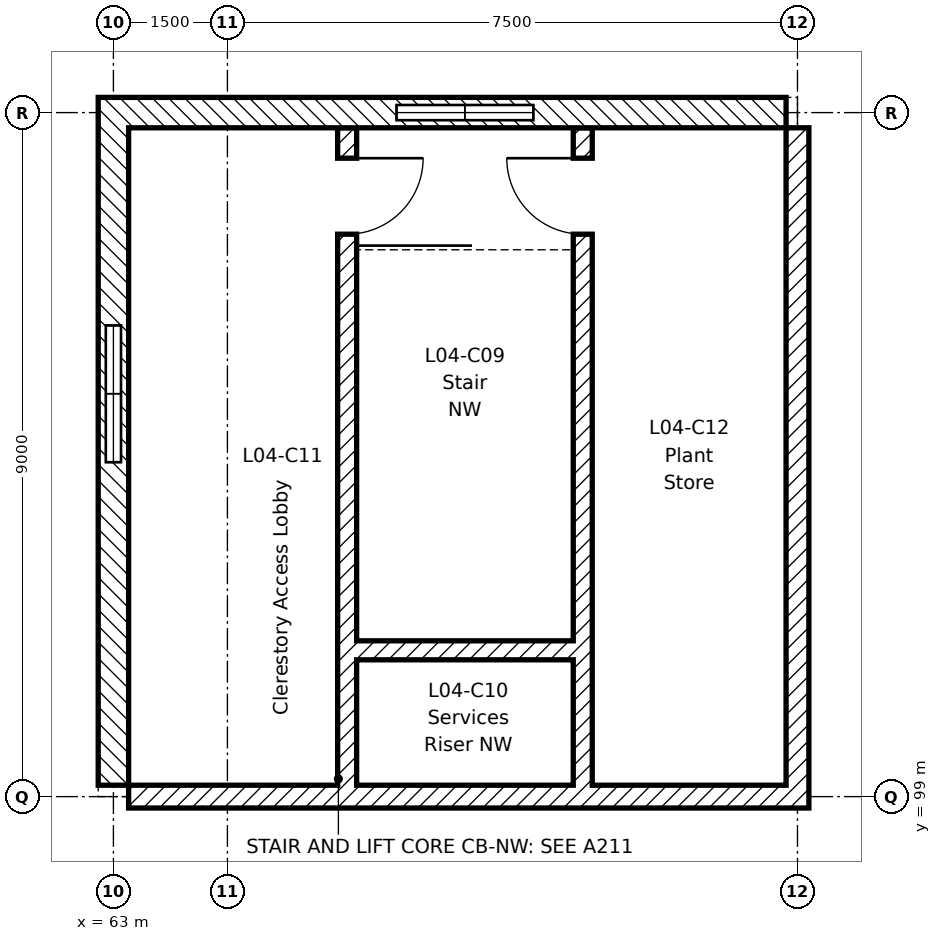
"""IFC4 building model, lengths in metres.
Left out: names, types, materials, properties, quantities, classifications, styles, units other than length and angle.
Written with IfcOpenShell. Run it as: python <this file> out.ifc"""

import sys

from ifc_helpers import new_model, si_unit, direction, frame, frame_2d, origin, place, context, subcontext, project, spatial, rectangle, extrude, element, fill, save


model = new_model("IFC4")
c1 = context("Model", 3, precision=1e-05, world=origin(), true_north=direction((0.0, 1.0)))
c2 = subcontext(c1, "Body", "Model", "MODEL_VIEW")
j1 = project(units=[si_unit("LENGTHUNIT", "METRE"), si_unit("PLANEANGLEUNIT", "RADIAN")], contexts=[c1])
p1 = place(None, origin())
s1 = spatial("IfcSite", under=j1, at=p1, CompositionType="ELEMENT")
p2 = place(p1, origin())
s2 = spatial("IfcBuilding", under=s1, at=p2, CompositionType="ELEMENT")
p3 = place(p2, frame((0.0, 0.0, 18.6)))
s3 = spatial("IfcBuildingStorey", under=s2, at=p3, CompositionType="ELEMENT", Elevation=18.6)
p4 = place(p3, frame((63.2, 99.0, 0.0), z_axis=(0.0, 0.0, 1.0), x_axis=(1.0, 0.0, 0.0)))
e1 = element("IfcWall", 1, at=p4, inside=s3, PredefinedType="SHEAR", context=c2, shape_type="SweptSolid", body=[
    extrude(rectangle(XDim=8.95, YDim=0.3, at=frame_2d((4.475, 0.0))), origin(), (0.0, 0.0, 1.0), 3.95),
])
p5 = place(p3, frame((72.0, 107.8, 0.0), z_axis=(0.0, 0.0, 1.0), x_axis=(0.0, -1.0, 0.0)))
e2 = element("IfcWall", 2, at=p5, inside=s3, PredefinedType="SHEAR", context=c2, shape_type="SweptSolid", body=[
    extrude(rectangle(XDim=8.65, YDim=0.3, at=frame_2d((4.325, 0.0))), origin(), (0.0, 0.0, 1.0), 3.95),
])
p6 = place(p3, frame((66.075, 107.8, 0.0), z_axis=(0.0, 0.0, 1.0), x_axis=(0.0, -1.0, 0.0)))
e3 = element("IfcWall", 3, at=p6, inside=s3, PredefinedType="SHEAR", context=c2, shape_type="SweptSolid", body=[
    extrude(rectangle(XDim=8.65, YDim=0.25, at=frame_2d((4.325, 0.0))), origin(), (0.0, 0.0, 1.0), 3.95),
])
p7 = place(p6, frame((0.4, 0.0, 0.0)))
e4 = element("IfcOpeningElement", 4, at=p7, cuts=e3, PredefinedType="OPENING", context=c2, shape_type="SweptSolid", body=[
    extrude(rectangle(XDim=1.0, YDim=2.1, at=frame_2d((0.5, 1.05))), frame((0.0, 0.135, 0.0), z_axis=(0.0, -1.0, 0.0), x_axis=(1.0, 0.0, 0.0)), (0.0, 0.0, 1.0), 0.27),
])
p8 = place(p3, frame((69.175, 107.8, 0.0), z_axis=(0.0, 0.0, 1.0), x_axis=(0.0, -1.0, 0.0)))
e5 = element("IfcWall", 5, at=p8, inside=s3, PredefinedType="SHEAR", context=c2, shape_type="SweptSolid", body=[
    extrude(rectangle(XDim=8.65, YDim=0.25, at=frame_2d((4.325, 0.0))), origin(), (0.0, 0.0, 1.0), 3.95),
])
p9 = place(p8, frame((0.4, 0.0, 0.0)))
e6 = element("IfcOpeningElement", 6, at=p9, cuts=e5, PredefinedType="OPENING", context=c2, shape_type="SweptSolid", body=[
    extrude(rectangle(XDim=1.0, YDim=2.1, at=frame_2d((0.5, 1.05))), frame((0.0, 0.135, 0.0), z_axis=(0.0, -1.0, 0.0), x_axis=(1.0, 0.0, 0.0)), (0.0, 0.0, 1.0), 0.27),
])
p10 = place(p3, frame((66.2, 100.925, 0.0), z_axis=(0.0, 0.0, 1.0), x_axis=(1.0, 0.0, 0.0)))
e7 = element("IfcWall", 7, at=p10, inside=s3, PredefinedType="SHEAR", context=c2, shape_type="SweptSolid", body=[
    extrude(rectangle(XDim=2.85, YDim=0.25, at=frame_2d((1.425, 0.0))), origin(), (0.0, 0.0, 1.0), 3.95),
])
p11 = place(p3, frame((62.8, 108.0, 0.0), z_axis=(0.0, 0.0, 1.0), x_axis=(1.0, 0.0, 0.0)))
e8 = element("IfcWall", 8, at=p11, inside=s3, PredefinedType="STANDARD", context=c2, shape_type="SweptSolid", body=[
    extrude(rectangle(XDim=3.925, YDim=0.4, at=frame_2d((1.962, 0.0))), origin(), (0.0, 0.0, 1.0), 3.95),
])
p12 = place(p3, frame((68.525, 108.0, 0.0), z_axis=(0.0, 0.0, 1.0), x_axis=(1.0, 0.0, 0.0)))
e9 = element("IfcWall", 9, at=p12, inside=s3, PredefinedType="STANDARD", context=c2, shape_type="SweptSolid", body=[
    extrude(rectangle(XDim=3.325, YDim=0.4, at=frame_2d((1.663, 0.0))), origin(), (0.0, 0.0, 1.0), 3.95),
])
p13 = place(p3, frame((66.725, 108.0, 0.0), z_axis=(0.0, 0.0, 1.0), x_axis=(1.0, 0.0, 0.0)))
e10 = element("IfcWall", 10, at=p13, inside=s3, PredefinedType="STANDARD", context=c2, shape_type="SweptSolid", body=[
    extrude(rectangle(XDim=1.8, YDim=0.4, at=frame_2d((0.9, 0.0))), origin(), (0.0, 0.0, 1.0), 0.9),
])
p14 = place(p3, frame((63.0, 99.15, 0.0), z_axis=(0.0, 0.0, 1.0), x_axis=(0.0, 1.0, 0.0)))
e11 = element("IfcWall", 11, at=p14, inside=s3, PredefinedType="STANDARD", context=c2, shape_type="SweptSolid", body=[
    extrude(rectangle(XDim=4.25, YDim=0.4, at=frame_2d((2.125, 0.0))), origin(), (0.0, 0.0, 1.0), 3.95),
])
p15 = place(p3, frame((63.0, 105.2, 0.0), z_axis=(0.0, 0.0, 1.0), x_axis=(0.0, 1.0, 0.0)))
e12 = element("IfcWall", 12, at=p15, inside=s3, PredefinedType="STANDARD", context=c2, shape_type="SweptSolid", body=[
    extrude(rectangle(XDim=2.6, YDim=0.4, at=frame_2d((1.3, 0.0))), origin(), (0.0, 0.0, 1.0), 3.95),
])
p16 = place(p3, frame((63.0, 103.4, 0.0), z_axis=(0.0, 0.0, 1.0), x_axis=(0.0, 1.0, 0.0)))
e13 = element("IfcWall", 13, at=p16, inside=s3, PredefinedType="STANDARD", context=c2, shape_type="SweptSolid", body=[
    extrude(rectangle(XDim=1.8, YDim=0.4, at=frame_2d((0.9, 0.0))), origin(), (0.0, 0.0, 1.0), 0.9),
])
p17 = place(p7, origin())
e14 = element("IfcDoor", 14, at=p17, inside=s3, OperationType="SINGLE_SWING_LEFT", PredefinedType="DOOR", context=c2, shape_type="SweptSolid", body=[
    extrude(rectangle(XDim=1.0, YDim=2.1, at=frame_2d((0.5, 1.05))), frame((0.0, 0.025, 0.0), z_axis=(0.0, -1.0, 0.0), x_axis=(1.0, 0.0, 0.0)), (0.0, 0.0, 1.0), 0.05),
])
fill(e4, e14)
p18 = place(p9, frame((1.0, 0.0, 0.0), z_axis=(0.0, 0.0, 1.0), x_axis=(-1.0, 0.0, 0.0)))
e15 = element("IfcDoor", 15, at=p18, inside=s3, OperationType="SINGLE_SWING_RIGHT", PredefinedType="DOOR", context=c2, shape_type="SweptSolid", body=[
    extrude(rectangle(XDim=1.0, YDim=2.1, at=frame_2d((0.5, 1.05))), frame((0.0, 0.025, 0.0), z_axis=(0.0, -1.0, 0.0), x_axis=(1.0, 0.0, 0.0)), (0.0, 0.0, 1.0), 0.05),
])
fill(e6, e15)
save(model, sys.argv[1])
